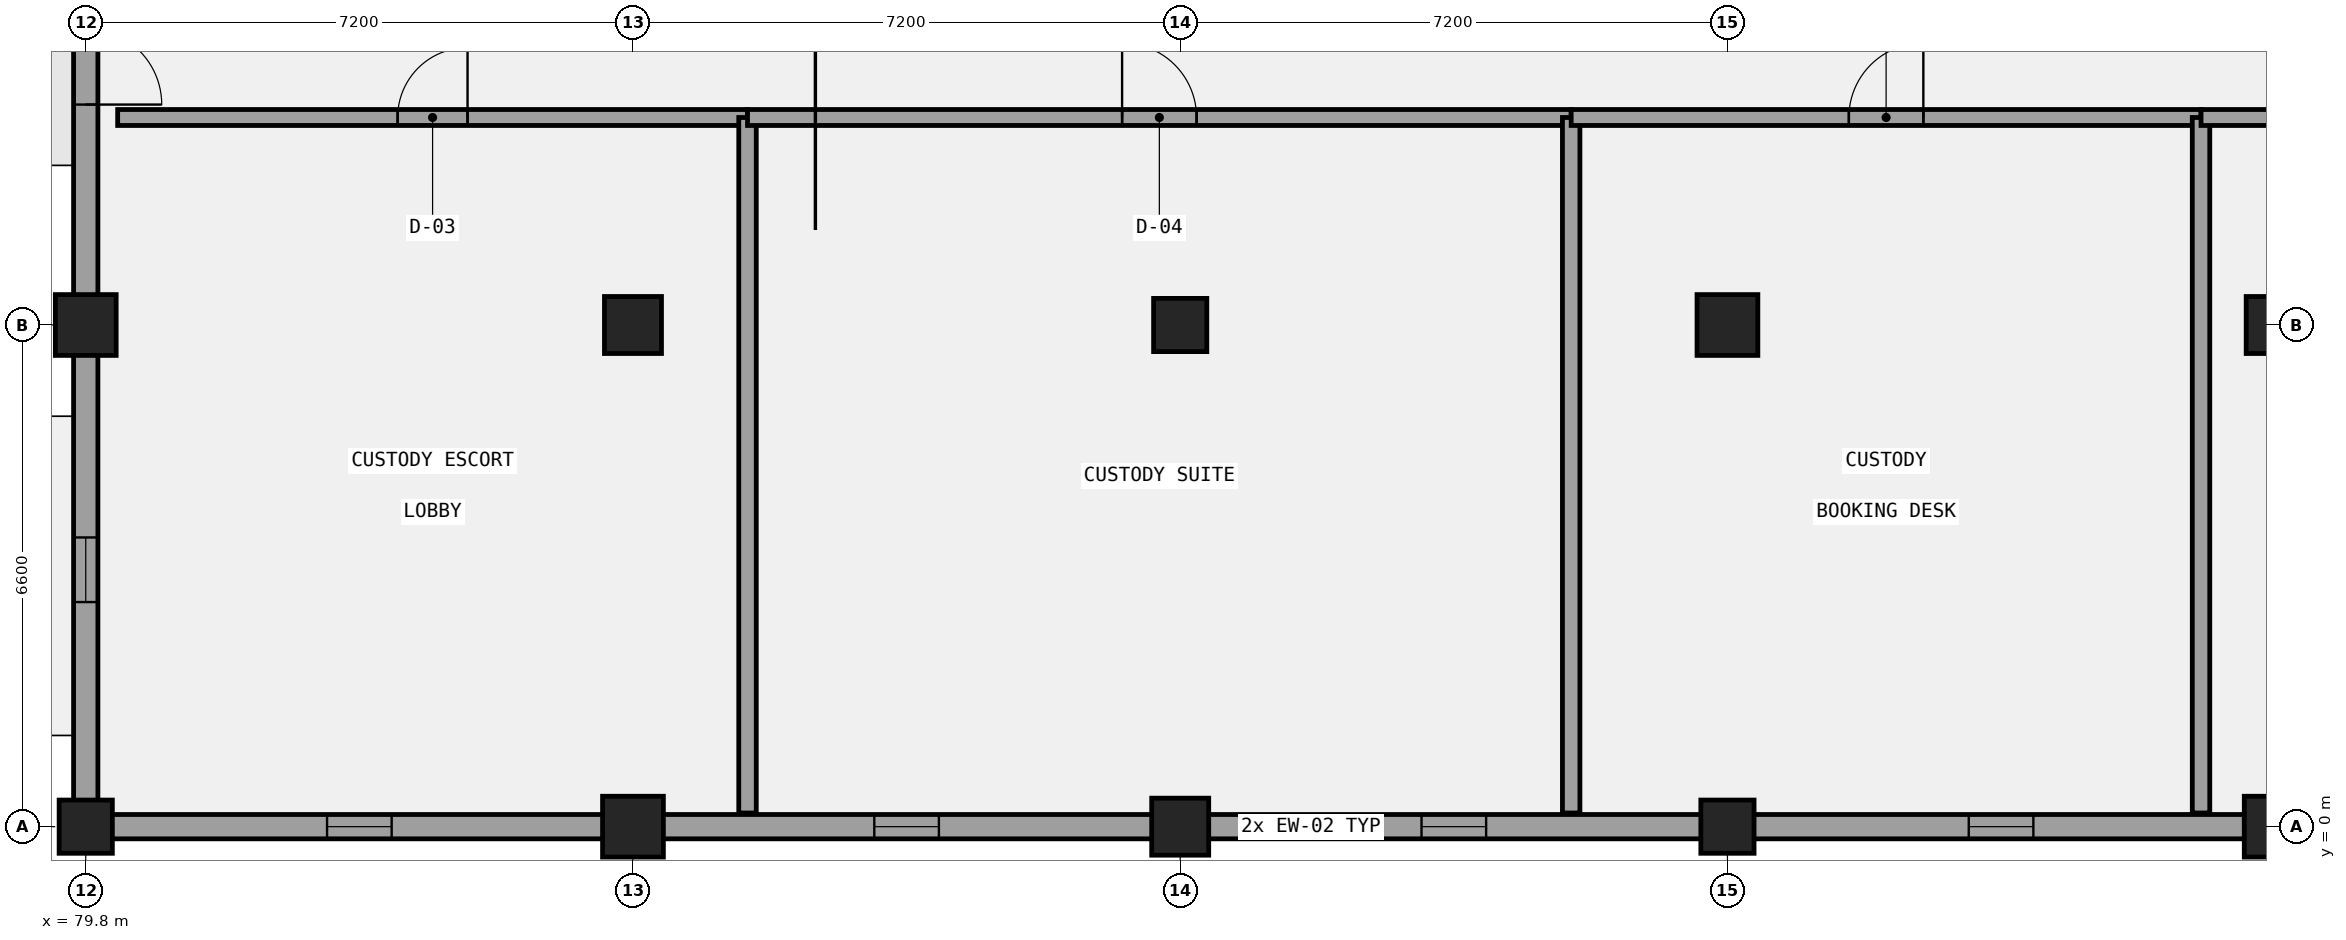
"""IFC4 building model, lengths in metres.
Left out: names, types, materials, properties, quantities, classifications, styles, units other than length and angle.
Written with IfcOpenShell. Run it as: python <this file> out.ifc"""

import sys

from ifc_helpers import new_model, si_unit, direction, frame, frame_2d, origin, origin_2d, place, context, subcontext, project, spatial, rectangle, extrude, element, fill, save


model = new_model("IFC4")
c1 = context("Model", 3, precision=1e-05, world=origin(), true_north=direction((0.0, 1.0)))
c2 = subcontext(c1, "Body", "Model", "MODEL_VIEW")
j1 = project(units=[si_unit("LENGTHUNIT", "METRE"), si_unit("PLANEANGLEUNIT", "RADIAN")], contexts=[c1])
p1 = place(None, origin())
s1 = spatial("IfcSite", under=j1, at=p1, CompositionType="ELEMENT")
p2 = place(p1, origin())
s2 = spatial("IfcBuilding", under=s1, at=p2, CompositionType="ELEMENT")
p3 = place(p2, origin())
s3 = spatial("IfcBuildingStorey", under=s2, at=p3, CompositionType="ELEMENT", Elevation=0.0)
p4 = place(p3, frame((79.8, 0.0, -0.32), z_axis=(0.0, 0.0, 1.0), x_axis=(1.0, 0.0, 0.0)))
e1 = element("IfcColumn", 1, at=p4, inside=s3, PredefinedType="COLUMN", context=c2, shape_type="SweptSolid", body=[
    extrude(rectangle(XDim=0.7, YDim=0.7, at=origin_2d()), origin(), (0.0, 0.0, 1.0), 5.72),
])
for number, where, z_axis, x_axis in (
    (2, (79.8, 6.6, -0.32), (0.0, 0.0, 1.0), (1.0, 0.0, 0.0)),
    (3, (87.0, 0.0, -0.32), (0.0, 0.0, 1.0), (1.0, 0.0, 0.0)),
):
    element("IfcColumn", number, at=place(p3, frame(where, z_axis=z_axis, x_axis=x_axis)), inside=s3, PredefinedType="COLUMN", context=c2, shape_type="SweptSolid", body=[
        extrude(rectangle(XDim=0.8, YDim=0.8, at=origin_2d()), origin(), (0.0, 0.0, 1.0), 5.72),
    ])
for number, where, z_axis, x_axis in (
    (4, (87.0, 6.6, -0.32), (0.0, 0.0, 1.0), (1.0, 0.0, 0.0)),
    (5, (94.2, 0.0, -0.32), (0.0, 0.0, 1.0), (1.0, 0.0, 0.0)),
):
    element("IfcColumn", number, at=place(p3, frame(where, z_axis=z_axis, x_axis=x_axis)), inside=s3, PredefinedType="COLUMN", context=c2, shape_type="SweptSolid", body=[
        extrude(rectangle(XDim=0.75, YDim=0.75, at=origin_2d()), origin(), (0.0, 0.0, 1.0), 5.72),
    ])
for number, where, z_axis, x_axis in (
    (6, (94.2, 6.6, -0.32), (0.0, 0.0, 1.0), (1.0, 0.0, 0.0)),
    (7, (101.4, 0.0, -0.32), (0.0, 0.0, 1.0), (1.0, 0.0, 0.0)),
):
    element("IfcColumn", number, at=place(p3, frame(where, z_axis=z_axis, x_axis=x_axis)), inside=s3, PredefinedType="COLUMN", context=c2, shape_type="SweptSolid", body=[
        extrude(rectangle(XDim=0.7, YDim=0.7, at=origin_2d()), origin(), (0.0, 0.0, 1.0), 5.72),
    ])
for number, where, z_axis, x_axis in (
    (8, (101.4, 6.6, -0.32), (0.0, 0.0, 1.0), (1.0, 0.0, 0.0)),
    (9, (108.6, 0.0, -0.32), (0.0, 0.0, 1.0), (1.0, 0.0, 0.0)),
):
    element("IfcColumn", number, at=place(p3, frame(where, z_axis=z_axis, x_axis=x_axis)), inside=s3, PredefinedType="COLUMN", context=c2, shape_type="SweptSolid", body=[
        extrude(rectangle(XDim=0.8, YDim=0.8, at=origin_2d()), origin(), (0.0, 0.0, 1.0), 5.72),
    ])
p5 = place(p3, frame((108.6, 6.6, -0.32), z_axis=(0.0, 0.0, 1.0), x_axis=(1.0, 0.0, 0.0)))
e10 = element("IfcColumn", 10, at=p5, inside=s3, PredefinedType="COLUMN", context=c2, shape_type="SweptSolid", body=[
    extrude(rectangle(XDim=0.75, YDim=0.75, at=origin_2d()), origin(), (0.0, 0.0, 1.0), 5.72),
])
p6 = place(p3, frame((79.8, 20.84, 0.0), z_axis=(0.0, 0.0, 1.0), x_axis=(0.0, -1.0, 0.0)))
e11 = element("IfcWall", 11, at=p6, inside=s3, PredefinedType="SOLIDWALL", context=c2, shape_type="SweptSolid", body=[
    extrude(rectangle(XDim=20.68, YDim=0.32, at=frame_2d((10.34, 0.0))), origin(), (0.0, 0.0, 1.0), 4.12),
])
p7 = place(p6, frame((9.34, 0.0, 0.0)))
e12 = element("IfcOpeningElement", 12, at=p7, cuts=e11, PredefinedType="OPENING", context=c2, shape_type="SweptSolid", body=[
    extrude(rectangle(XDim=2.0, YDim=2.6, at=frame_2d((1.0, 1.3))), frame((0.0, 0.17, 0.0), z_axis=(0.0, -1.0, 0.0), x_axis=(1.0, 0.0, 0.0)), (0.0, 0.0, 1.0), 0.34),
])
p8 = place(p6, frame((17.035, 0.0, 1.0)))
e13 = element("IfcOpeningElement", 13, at=p8, cuts=e11, PredefinedType="OPENING", context=c2, shape_type="SweptSolid", body=[
    extrude(rectangle(XDim=0.85, YDim=1.4, at=frame_2d((0.425, 0.7))), frame((0.0, 0.17, 0.0), z_axis=(0.0, -1.0, 0.0), x_axis=(1.0, 0.0, 0.0)), (0.0, 0.0, 1.0), 0.34),
])
p9 = place(p6, frame((3.095, 0.0, 1.0)))
e14 = element("IfcOpeningElement", 14, at=p9, cuts=e11, PredefinedType="OPENING", context=c2, shape_type="SweptSolid", body=[
    extrude(rectangle(XDim=0.85, YDim=1.4, at=frame_2d((0.425, 0.7))), frame((0.0, 0.17, 0.0), z_axis=(0.0, -1.0, 0.0), x_axis=(1.0, 0.0, 0.0)), (0.0, 0.0, 1.0), 0.34),
])
p10 = place(p3, frame((79.64, 0.0, 0.0), z_axis=(0.0, 0.0, 1.0), x_axis=(1.0, 0.0, 0.0)))
e15 = element("IfcWall", 15, at=p10, inside=s3, PredefinedType="SOLIDWALL", context=c2, shape_type="SweptSolid", body=[
    extrude(rectangle(XDim=65.12, YDim=0.32, at=frame_2d((32.56, 0.0))), origin(), (0.0, 0.0, 1.0), 4.37),
])
p11 = place(p10, frame((51.96, 0.0, 0.0)))
e16 = element("IfcOpeningElement", 16, at=p11, cuts=e15, PredefinedType="OPENING", context=c2, shape_type="SweptSolid", body=[
    extrude(rectangle(XDim=4.4, YDim=3.8, at=frame_2d((2.2, 1.9))), frame((0.0, 0.17, 0.0), z_axis=(0.0, -1.0, 0.0), x_axis=(1.0, 0.0, 0.0)), (0.0, 0.0, 1.0), 0.34),
])
p12 = place(p10, frame((31.66, 0.0, 0.0)))
e17 = element("IfcOpeningElement", 17, at=p12, cuts=e15, PredefinedType="OPENING", context=c2, shape_type="SweptSolid", body=[
    extrude(rectangle(XDim=1.8, YDim=2.4, at=frame_2d((0.9, 1.2))), frame((0.0, 0.17, 0.0), z_axis=(0.0, -1.0, 0.0), x_axis=(1.0, 0.0, 0.0)), (0.0, 0.0, 1.0), 0.34),
])
p13 = place(p10, frame((3.335, 0.0, 1.0)))
e18 = element("IfcOpeningElement", 18, at=p13, cuts=e15, PredefinedType="OPENING", context=c2, shape_type="SweptSolid", body=[
    extrude(rectangle(XDim=0.85, YDim=1.65, at=frame_2d((0.425, 0.825))), frame((0.0, 0.17, 0.0), z_axis=(0.0, -1.0, 0.0), x_axis=(1.0, 0.0, 0.0)), (0.0, 0.0, 1.0), 0.34),
])
p14 = place(p10, frame((10.535, 0.0, 1.0)))
e19 = element("IfcOpeningElement", 19, at=p14, cuts=e15, PredefinedType="OPENING", context=c2, shape_type="SweptSolid", body=[
    extrude(rectangle(XDim=0.85, YDim=1.65, at=frame_2d((0.425, 0.825))), frame((0.0, 0.17, 0.0), z_axis=(0.0, -1.0, 0.0), x_axis=(1.0, 0.0, 0.0)), (0.0, 0.0, 1.0), 0.34),
])
p15 = place(p10, frame((17.735, 0.0, 1.0)))
e20 = element("IfcOpeningElement", 20, at=p15, cuts=e15, PredefinedType="OPENING", context=c2, shape_type="SweptSolid", body=[
    extrude(rectangle(XDim=0.85, YDim=1.65, at=frame_2d((0.425, 0.825))), frame((0.0, 0.17, 0.0), z_axis=(0.0, -1.0, 0.0), x_axis=(1.0, 0.0, 0.0)), (0.0, 0.0, 1.0), 0.34),
])
p16 = place(p10, frame((24.935, 0.0, 1.0)))
e21 = element("IfcOpeningElement", 21, at=p16, cuts=e15, PredefinedType="OPENING", context=c2, shape_type="SweptSolid", body=[
    extrude(rectangle(XDim=0.85, YDim=1.65, at=frame_2d((0.425, 0.825))), frame((0.0, 0.17, 0.0), z_axis=(0.0, -1.0, 0.0), x_axis=(1.0, 0.0, 0.0)), (0.0, 0.0, 1.0), 0.34),
])
p17 = place(p10, frame((39.335, 0.0, 1.0)))
e22 = element("IfcOpeningElement", 22, at=p17, cuts=e15, PredefinedType="OPENING", context=c2, shape_type="SweptSolid", body=[
    extrude(rectangle(XDim=0.85, YDim=1.65, at=frame_2d((0.425, 0.825))), frame((0.0, 0.17, 0.0), z_axis=(0.0, -1.0, 0.0), x_axis=(1.0, 0.0, 0.0)), (0.0, 0.0, 1.0), 0.34),
])
p18 = place(p10, frame((46.535, 0.0, 1.0)))
e23 = element("IfcOpeningElement", 23, at=p18, cuts=e15, PredefinedType="OPENING", context=c2, shape_type="SweptSolid", body=[
    extrude(rectangle(XDim=0.85, YDim=1.65, at=frame_2d((0.425, 0.825))), frame((0.0, 0.17, 0.0), z_axis=(0.0, -1.0, 0.0), x_axis=(1.0, 0.0, 0.0)), (0.0, 0.0, 1.0), 0.34),
])
p19 = place(p10, frame((60.935, 0.0, 1.0)))
e24 = element("IfcOpeningElement", 24, at=p19, cuts=e15, PredefinedType="OPENING", context=c2, shape_type="SweptSolid", body=[
    extrude(rectangle(XDim=0.85, YDim=1.65, at=frame_2d((0.425, 0.825))), frame((0.0, 0.17, 0.0), z_axis=(0.0, -1.0, 0.0), x_axis=(1.0, 0.0, 0.0)), (0.0, 0.0, 1.0), 0.34),
])
p20 = place(p3, frame((80.22, 9.33, 0.0), z_axis=(0.0, 0.0, 1.0), x_axis=(1.0, 0.0, 0.0)))
e25 = element("IfcWall", 25, at=p20, inside=s3, PredefinedType="PARTITIONING", context=c2, shape_type="SweptSolid", body=[
    extrude(rectangle(XDim=8.287, YDim=0.21, at=frame_2d((4.144, 0.0))), origin(), (0.0, 0.0, 1.0), 5.12),
])
p21 = place(p20, frame((3.684, 0.0, 0.0)))
e26 = element("IfcOpeningElement", 26, at=p21, cuts=e25, PredefinedType="OPENING", context=c2, shape_type="SweptSolid", body=[
    extrude(rectangle(XDim=0.92, YDim=2.35, at=frame_2d((0.46, 1.175))), frame((0.0, 0.115, 0.0), z_axis=(0.0, -1.0, 0.0), x_axis=(1.0, 0.0, 0.0)), (0.0, 0.0, 1.0), 0.23),
])
p22 = place(p3, frame((88.507, 0.18, 0.0), z_axis=(0.0, 0.0, 1.0), x_axis=(0.0, 1.0, 0.0)))
e27 = element("IfcWall", 27, at=p22, inside=s3, PredefinedType="PARTITIONING", context=c2, shape_type="SweptSolid", body=[
    extrude(rectangle(XDim=9.15, YDim=0.23, at=frame_2d((4.575, 0.0))), origin(), (0.0, 0.0, 1.0), 5.12),
])
p23 = place(p3, frame((88.507, 9.33, 0.0), z_axis=(0.0, 0.0, 1.0), x_axis=(1.0, 0.0, 0.0)))
e28 = element("IfcWall", 28, at=p23, inside=s3, PredefinedType="PARTITIONING", context=c2, shape_type="SweptSolid", body=[
    extrude(rectangle(XDim=10.837, YDim=0.21, at=frame_2d((5.418, 0.0))), origin(), (0.0, 0.0, 1.0), 5.12),
])
p24 = place(p23, frame((4.928, 0.0, 0.0)))
e29 = element("IfcOpeningElement", 29, at=p24, cuts=e28, PredefinedType="OPENING", context=c2, shape_type="SweptSolid", body=[
    extrude(rectangle(XDim=0.98, YDim=2.1, at=frame_2d((0.49, 1.05))), frame((0.0, 0.115, 0.0), z_axis=(0.0, -1.0, 0.0), x_axis=(1.0, 0.0, 0.0)), (0.0, 0.0, 1.0), 0.23),
])
p25 = place(p3, frame((99.344, 0.18, 0.0), z_axis=(0.0, 0.0, 1.0), x_axis=(0.0, 1.0, 0.0)))
e30 = element("IfcWall", 30, at=p25, inside=s3, PredefinedType="PARTITIONING", context=c2, shape_type="SweptSolid", body=[
    extrude(rectangle(XDim=9.15, YDim=0.23, at=frame_2d((4.575, 0.0))), origin(), (0.0, 0.0, 1.0), 5.12),
])
p26 = place(p3, frame((99.344, 9.33, 0.0), z_axis=(0.0, 0.0, 1.0), x_axis=(1.0, 0.0, 0.0)))
e31 = element("IfcWall", 31, at=p26, inside=s3, PredefinedType="PARTITIONING", context=c2, shape_type="SweptSolid", body=[
    extrude(rectangle(XDim=8.287, YDim=0.21, at=frame_2d((4.144, 0.0))), origin(), (0.0, 0.0, 1.0), 5.12),
])
p27 = place(p26, frame((3.654, 0.0, 0.0)))
e32 = element("IfcOpeningElement", 32, at=p27, cuts=e31, PredefinedType="OPENING", context=c2, shape_type="SweptSolid", body=[
    extrude(rectangle(XDim=0.98, YDim=2.22, at=frame_2d((0.49, 1.11))), frame((0.0, 0.115, 0.0), z_axis=(0.0, -1.0, 0.0), x_axis=(1.0, 0.0, 0.0)), (0.0, 0.0, 1.0), 0.23),
])
p28 = place(p3, frame((107.631, 0.18, 0.0), z_axis=(0.0, 0.0, 1.0), x_axis=(0.0, 1.0, 0.0)))
e33 = element("IfcWall", 33, at=p28, inside=s3, PredefinedType="PARTITIONING", context=c2, shape_type="SweptSolid", body=[
    extrude(rectangle(XDim=9.15, YDim=0.23, at=frame_2d((4.575, 0.0))), origin(), (0.0, 0.0, 1.0), 5.12),
])
p29 = place(p3, frame((107.631, 9.33, 0.0), z_axis=(0.0, 0.0, 1.0), x_axis=(1.0, 0.0, 0.0)))
e34 = element("IfcWall", 34, at=p29, inside=s3, PredefinedType="PARTITIONING", context=c2, shape_type="SweptSolid", body=[
    extrude(rectangle(XDim=9.138, YDim=0.21, at=frame_2d((4.569, 0.0))), origin(), (0.0, 0.0, 1.0), 5.12),
])
p30 = place(p29, frame((4.079, 0.0, 0.0)))
e35 = element("IfcOpeningElement", 35, at=p30, cuts=e34, PredefinedType="OPENING", context=c2, shape_type="SweptSolid", body=[
    extrude(rectangle(XDim=0.98, YDim=2.35, at=frame_2d((0.49, 1.175))), frame((0.0, 0.115, 0.0), z_axis=(0.0, -1.0, 0.0), x_axis=(1.0, 0.0, 0.0)), (0.0, 0.0, 1.0), 0.23),
])
p31 = place(p7, frame((2.0, 0.0, 0.0), z_axis=(0.0, 0.0, 1.0), x_axis=(-1.0, 0.0, 0.0)))
e36 = element("IfcDoor", 36, at=p31, inside=s3, OperationType="DOUBLE_DOOR_SINGLE_SWING", PredefinedType="DOOR", context=c2, shape_type="SweptSolid", body=[
    extrude(rectangle(XDim=2.0, YDim=2.6, at=frame_2d((1.0, 1.3))), frame((0.0, 0.025, 0.0), z_axis=(0.0, -1.0, 0.0), x_axis=(1.0, 0.0, 0.0)), (0.0, 0.0, 1.0), 0.05),
])
fill(e12, e36)
p32 = place(p8, origin())
e37 = element("IfcWindow", 37, at=p32, inside=s3, PartitioningType="SINGLE_PANEL", PredefinedType="WINDOW", context=c2, shape_type="SweptSolid", body=[
    extrude(rectangle(XDim=0.85, YDim=1.4, at=frame_2d((0.425, 0.7))), frame((0.0, 0.03, 0.0), z_axis=(0.0, -1.0, 0.0), x_axis=(1.0, 0.0, 0.0)), (0.0, 0.0, 1.0), 0.06),
])
fill(e13, e37)
p33 = place(p13, origin())
e38 = element("IfcWindow", 38, at=p33, inside=s3, PartitioningType="SINGLE_PANEL", PredefinedType="WINDOW", context=c2, shape_type="SweptSolid", body=[
    extrude(rectangle(XDim=0.85, YDim=1.65, at=frame_2d((0.425, 0.825))), frame((0.0, 0.03, 0.0), z_axis=(0.0, -1.0, 0.0), x_axis=(1.0, 0.0, 0.0)), (0.0, 0.0, 1.0), 0.06),
])
fill(e18, e38)
p34 = place(p14, origin())
e39 = element("IfcWindow", 39, at=p34, inside=s3, PartitioningType="SINGLE_PANEL", PredefinedType="WINDOW", context=c2, shape_type="SweptSolid", body=[
    extrude(rectangle(XDim=0.85, YDim=1.65, at=frame_2d((0.425, 0.825))), frame((0.0, 0.03, 0.0), z_axis=(0.0, -1.0, 0.0), x_axis=(1.0, 0.0, 0.0)), (0.0, 0.0, 1.0), 0.06),
])
fill(e19, e39)
p35 = place(p15, origin())
e40 = element("IfcWindow", 40, at=p35, inside=s3, PartitioningType="SINGLE_PANEL", PredefinedType="WINDOW", context=c2, shape_type="SweptSolid", body=[
    extrude(rectangle(XDim=0.85, YDim=1.65, at=frame_2d((0.425, 0.825))), frame((0.0, 0.03, 0.0), z_axis=(0.0, -1.0, 0.0), x_axis=(1.0, 0.0, 0.0)), (0.0, 0.0, 1.0), 0.06),
])
fill(e20, e40)
p36 = place(p16, origin())
e41 = element("IfcWindow", 41, at=p36, inside=s3, PartitioningType="SINGLE_PANEL", PredefinedType="WINDOW", context=c2, shape_type="SweptSolid", body=[
    extrude(rectangle(XDim=0.85, YDim=1.65, at=frame_2d((0.425, 0.825))), frame((0.0, 0.03, 0.0), z_axis=(0.0, -1.0, 0.0), x_axis=(1.0, 0.0, 0.0)), (0.0, 0.0, 1.0), 0.06),
])
fill(e21, e41)
p37 = place(p21, frame((0.92, 0.0, 0.0), z_axis=(0.0, 0.0, 1.0), x_axis=(-1.0, 0.0, 0.0)))
e42 = element("IfcDoor", 42, at=p37, inside=s3, OperationType="SINGLE_SWING_RIGHT", PredefinedType="DOOR", context=c2, shape_type="SweptSolid", body=[
    extrude(rectangle(XDim=0.92, YDim=2.35, at=frame_2d((0.46, 1.175))), frame((0.0, 0.025, 0.0), z_axis=(0.0, -1.0, 0.0), x_axis=(1.0, 0.0, 0.0)), (0.0, 0.0, 1.0), 0.05),
])
fill(e26, e42)
p38 = place(p24, frame((0.98, 0.0, 0.0), z_axis=(0.0, 0.0, 1.0), x_axis=(-1.0, 0.0, 0.0)))
e43 = element("IfcDoor", 43, at=p38, inside=s3, OperationType="SINGLE_SWING_LEFT", PredefinedType="DOOR", context=c2, shape_type="SweptSolid", body=[
    extrude(rectangle(XDim=0.98, YDim=2.1, at=frame_2d((0.49, 1.05))), frame((0.0, 0.025, 0.0), z_axis=(0.0, -1.0, 0.0), x_axis=(1.0, 0.0, 0.0)), (0.0, 0.0, 1.0), 0.05),
])
fill(e29, e43)
p39 = place(p27, frame((0.98, 0.0, 0.0), z_axis=(0.0, 0.0, 1.0), x_axis=(-1.0, 0.0, 0.0)))
e44 = element("IfcDoor", 44, at=p39, inside=s3, OperationType="SINGLE_SWING_RIGHT", PredefinedType="DOOR", context=c2, shape_type="SweptSolid", body=[
    extrude(rectangle(XDim=0.98, YDim=2.22, at=frame_2d((0.49, 1.11))), frame((0.0, 0.025, 0.0), z_axis=(0.0, -1.0, 0.0), x_axis=(1.0, 0.0, 0.0)), (0.0, 0.0, 1.0), 0.05),
])
fill(e32, e44)
save(model, sys.argv[1])
